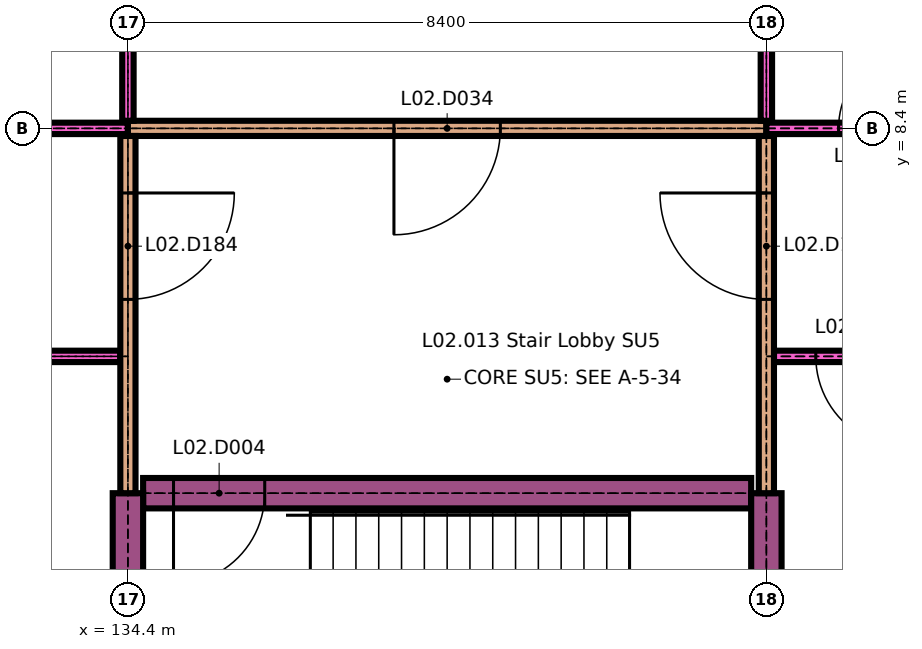
"""IFC4 building model, lengths in metres.
Left out: names, types, materials, properties, quantities, classifications, styles, units other than length and angle.
Written with IfcOpenShell. Run it as: python <this file> out.ifc"""

import sys

from ifc_helpers import new_model, si_unit, direction, frame, frame_2d, origin, place, context, subcontext, project, spatial, rectangle, extrude, element, fill, save


model = new_model("IFC4")
c1 = context("Model", 3, precision=1e-05, world=origin(), true_north=direction((0.0, 1.0)))
c2 = subcontext(c1, "Body", "Model", "MODEL_VIEW")
j1 = project(units=[si_unit("LENGTHUNIT", "METRE"), si_unit("PLANEANGLEUNIT", "RADIAN")], contexts=[c1])
p1 = place(None, origin())
s1 = spatial("IfcSite", under=j1, at=p1, CompositionType="ELEMENT")
p2 = place(p1, origin())
s2 = spatial("IfcBuilding", under=s1, at=p2, CompositionType="ELEMENT")
p3 = place(p2, frame((0.0, 0.0, 8.4)))
s3 = spatial("IfcBuildingStorey", under=s2, at=p3, CompositionType="ELEMENT", Elevation=8.4)
p4 = place(p3, frame((134.6, 3.6, 0.0), z_axis=(0.0, 0.0, 1.0), x_axis=(1.0, 0.0, 0.0)))
e1 = element("IfcWall", 1, at=p4, inside=s3, PredefinedType="SHEAR", context=c2, shape_type="SweptSolid", body=[
    extrude(rectangle(XDim=8.0, YDim=0.4, at=frame_2d((4.0, 0.0))), origin(), (0.0, 0.0, 1.0), 4.2),
])
p5 = place(p4, frame((0.4, 0.0, 0.0)))
e2 = element("IfcOpeningElement", 2, at=p5, cuts=e1, PredefinedType="OPENING", context=c2, shape_type="SweptSolid", body=[
    extrude(rectangle(XDim=1.2, YDim=2.1, at=frame_2d((0.6, 1.05))), frame((0.0, 0.21, 0.0), z_axis=(0.0, -1.0, 0.0), x_axis=(1.0, 0.0, 0.0)), (0.0, 0.0, 1.0), 0.42),
])
p6 = place(p3, frame((109.3, 5.4, 0.0), z_axis=(0.0, 0.0, 1.0), x_axis=(1.0, 0.0, 0.0)))
e3 = element("IfcWall", 3, at=p6, inside=s3, PredefinedType="PARTITIONING", context=c2, shape_type="SweptSolid", body=[
    extrude(rectangle(XDim=25.0, YDim=0.15, at=frame_2d((12.5, 0.0))), origin(), (0.0, 0.0, 1.0), 4.2),
])
p7 = place(p6, frame((1.55, 0.0, 0.0)))
e4 = element("IfcOpeningElement", 4, at=p7, cuts=e3, PredefinedType="OPENING", context=c2, shape_type="SweptSolid", body=[
    extrude(rectangle(XDim=1.8, YDim=2.4, at=frame_2d((0.9, 1.2))), frame((0.0, 0.085, 0.0), z_axis=(0.0, -1.0, 0.0), x_axis=(1.0, 0.0, 0.0)), (0.0, 0.0, 1.0), 0.17),
])
p8 = place(p6, frame((6.5, 0.0, 0.0)))
e5 = element("IfcOpeningElement", 5, at=p8, cuts=e3, PredefinedType="OPENING", context=c2, shape_type="SweptSolid", body=[
    extrude(rectangle(XDim=1.8, YDim=2.4, at=frame_2d((0.9, 1.2))), frame((0.0, 0.085, 0.0), z_axis=(0.0, -1.0, 0.0), x_axis=(1.0, 0.0, 0.0)), (0.0, 0.0, 1.0), 0.17),
])
p9 = place(p6, frame((11.5, 0.0, 0.0)))
e6 = element("IfcOpeningElement", 6, at=p9, cuts=e3, PredefinedType="OPENING", context=c2, shape_type="SweptSolid", body=[
    extrude(rectangle(XDim=1.8, YDim=2.4, at=frame_2d((0.9, 1.2))), frame((0.0, 0.085, 0.0), z_axis=(0.0, -1.0, 0.0), x_axis=(1.0, 0.0, 0.0)), (0.0, 0.0, 1.0), 0.17),
])
p10 = place(p6, frame((16.5, 0.0, 0.0)))
e7 = element("IfcOpeningElement", 7, at=p10, cuts=e3, PredefinedType="OPENING", context=c2, shape_type="SweptSolid", body=[
    extrude(rectangle(XDim=1.8, YDim=2.4, at=frame_2d((0.9, 1.2))), frame((0.0, 0.085, 0.0), z_axis=(0.0, -1.0, 0.0), x_axis=(1.0, 0.0, 0.0)), (0.0, 0.0, 1.0), 0.17),
])
p11 = place(p6, frame((21.55, 0.0, 0.0)))
e8 = element("IfcOpeningElement", 8, at=p11, cuts=e3, PredefinedType="OPENING", context=c2, shape_type="SweptSolid", body=[
    extrude(rectangle(XDim=1.8, YDim=2.4, at=frame_2d((0.9, 1.2))), frame((0.0, 0.085, 0.0), z_axis=(0.0, -1.0, 0.0), x_axis=(1.0, 0.0, 0.0)), (0.0, 0.0, 1.0), 0.17),
])
p12 = place(p3, frame((142.9, 5.4, 0.0), z_axis=(0.0, 0.0, 1.0), x_axis=(1.0, 0.0, 0.0)))
e9 = element("IfcWall", 9, at=p12, inside=s3, PredefinedType="PARTITIONING", context=c2, shape_type="SweptSolid", body=[
    extrude(rectangle(XDim=24.95, YDim=0.15, at=frame_2d((12.475, 0.0))), origin(), (0.0, 0.0, 1.0), 4.2),
])
p13 = place(p12, frame((0.55, 0.0, 0.0)))
e10 = element("IfcOpeningElement", 10, at=p13, cuts=e9, PredefinedType="OPENING", context=c2, shape_type="SweptSolid", body=[
    extrude(rectangle(XDim=1.2, YDim=2.1, at=frame_2d((0.6, 1.05))), frame((0.0, 0.085, 0.0), z_axis=(0.0, -1.0, 0.0), x_axis=(1.0, 0.0, 0.0)), (0.0, 0.0, 1.0), 0.17),
])
p14 = place(p12, frame((7.7, 0.0, 0.0)))
e11 = element("IfcOpeningElement", 11, at=p14, cuts=e9, PredefinedType="OPENING", context=c2, shape_type="SweptSolid", body=[
    extrude(rectangle(XDim=1.2, YDim=2.1, at=frame_2d((0.6, 1.05))), frame((0.0, 0.085, 0.0), z_axis=(0.0, -1.0, 0.0), x_axis=(1.0, 0.0, 0.0)), (0.0, 0.0, 1.0), 0.17),
])
p15 = place(p12, frame((16.1, 0.0, 0.0)))
e12 = element("IfcOpeningElement", 12, at=p15, cuts=e9, PredefinedType="OPENING", context=c2, shape_type="SweptSolid", body=[
    extrude(rectangle(XDim=1.8, YDim=2.4, at=frame_2d((0.9, 1.2))), frame((0.0, 0.085, 0.0), z_axis=(0.0, -1.0, 0.0), x_axis=(1.0, 0.0, 0.0)), (0.0, 0.0, 1.0), 0.17),
])
p16 = place(p12, frame((21.425, 0.0, 0.0)))
e13 = element("IfcOpeningElement", 13, at=p16, cuts=e9, PredefinedType="OPENING", context=c2, shape_type="SweptSolid", body=[
    extrude(rectangle(XDim=1.8, YDim=2.4, at=frame_2d((0.9, 1.2))), frame((0.0, 0.085, 0.0), z_axis=(0.0, -1.0, 0.0), x_axis=(1.0, 0.0, 0.0)), (0.0, 0.0, 1.0), 0.17),
])
p17 = place(p3, frame((126.45, 8.4, 0.0), z_axis=(0.0, 0.0, 1.0), x_axis=(1.0, 0.0, 0.0)))
e14 = element("IfcWall", 14, at=p17, inside=s3, PredefinedType="PARTITIONING", context=c2, shape_type="SweptSolid", body=[
    extrude(rectangle(XDim=7.95, YDim=0.15, at=frame_2d((3.975, 0.0))), origin(), (0.0, 0.0, 1.0), 4.2),
])
p18 = place(p17, frame((0.425, 0.0, 0.0)))
e15 = element("IfcOpeningElement", 15, at=p18, cuts=e14, PredefinedType="OPENING", context=c2, shape_type="SweptSolid", body=[
    extrude(rectangle(XDim=1.1, YDim=2.1, at=frame_2d((0.55, 1.05))), frame((0.0, 0.085, 0.0), z_axis=(0.0, -1.0, 0.0), x_axis=(1.0, 0.0, 0.0)), (0.0, 0.0, 1.0), 0.17),
])
p19 = place(p17, frame((2.9, 0.0, 0.0)))
e16 = element("IfcOpeningElement", 16, at=p19, cuts=e14, PredefinedType="OPENING", context=c2, shape_type="SweptSolid", body=[
    extrude(rectangle(XDim=1.1, YDim=2.1, at=frame_2d((0.55, 1.05))), frame((0.0, 0.085, 0.0), z_axis=(0.0, -1.0, 0.0), x_axis=(1.0, 0.0, 0.0)), (0.0, 0.0, 1.0), 0.17),
])
p20 = place(p3, frame((134.4, 8.4, 0.0), z_axis=(0.0, 0.0, 1.0), x_axis=(1.0, 0.0, 0.0)))
e17 = element("IfcWall", 17, at=p20, inside=s3, PredefinedType="PARTITIONING", context=c2, shape_type="SweptSolid", body=[
    extrude(rectangle(XDim=8.4, YDim=0.2, at=frame_2d((4.2, 0.0))), origin(), (0.0, 0.0, 1.0), 4.2),
])
p21 = place(p20, frame((3.5, 0.0, 0.0)))
e18 = element("IfcOpeningElement", 18, at=p21, cuts=e17, PredefinedType="OPENING", context=c2, shape_type="SweptSolid", body=[
    extrude(rectangle(XDim=1.4, YDim=2.1, at=frame_2d((0.7, 1.05))), frame((0.0, 0.11, 0.0), z_axis=(0.0, -1.0, 0.0), x_axis=(1.0, 0.0, 0.0)), (0.0, 0.0, 1.0), 0.22),
])
p22 = place(p3, frame((142.8, 8.4, 0.0), z_axis=(0.0, 0.0, 1.0), x_axis=(1.0, 0.0, 0.0)))
e19 = element("IfcWall", 19, at=p22, inside=s3, PredefinedType="PARTITIONING", context=c2, shape_type="SweptSolid", body=[
    extrude(rectangle(XDim=3.075, YDim=0.15, at=frame_2d((1.538, 0.0))), origin(), (0.0, 0.0, 1.0), 4.2),
])
p23 = place(p22, frame((0.95, 0.0, 0.0)))
e20 = element("IfcOpeningElement", 20, at=p23, cuts=e19, PredefinedType="OPENING", context=c2, shape_type="SweptSolid", body=[
    extrude(rectangle(XDim=1.1, YDim=2.1, at=frame_2d((0.55, 1.05))), frame((0.0, 0.085, 0.0), z_axis=(0.0, -1.0, 0.0), x_axis=(1.0, 0.0, 0.0)), (0.0, 0.0, 1.0), 0.17),
])
p24 = place(p3, frame((134.4, 0.15, 0.0), z_axis=(0.0, 0.0, 1.0), x_axis=(0.0, 1.0, 0.0)))
e21 = element("IfcWall", 21, at=p24, inside=s3, PredefinedType="SHEAR", context=c2, shape_type="SweptSolid", body=[
    extrude(rectangle(XDim=3.45, YDim=0.4, at=frame_2d((1.725, 0.0))), origin(), (0.0, 0.0, 1.0), 4.2),
])
p25 = place(p3, frame((134.4, 3.6, 0.0), z_axis=(0.0, 0.0, 1.0), x_axis=(0.0, 1.0, 0.0)))
e22 = element("IfcWall", 22, at=p25, inside=s3, PredefinedType="PARTITIONING", context=c2, shape_type="SweptSolid", body=[
    extrude(rectangle(XDim=4.7, YDim=0.2, at=frame_2d((2.35, 0.0))), origin(), (0.0, 0.0, 1.0), 4.2),
])
p26 = place(p25, frame((2.55, 0.0, 0.0)))
e23 = element("IfcOpeningElement", 23, at=p26, cuts=e22, PredefinedType="OPENING", context=c2, shape_type="SweptSolid", body=[
    extrude(rectangle(XDim=1.4, YDim=2.1, at=frame_2d((0.7, 1.05))), frame((0.0, 0.11, 0.0), z_axis=(0.0, -1.0, 0.0), x_axis=(1.0, 0.0, 0.0)), (0.0, 0.0, 1.0), 0.22),
])
p27 = place(p3, frame((134.4, 8.5, 0.0), z_axis=(0.0, 0.0, 1.0), x_axis=(0.0, 1.0, 0.0)))
e24 = element("IfcWall", 24, at=p27, inside=s3, PredefinedType="PARTITIONING", context=c2, shape_type="SweptSolid", body=[
    extrude(rectangle(XDim=5.225, YDim=0.15, at=frame_2d((2.613, 0.0))), origin(), (0.0, 0.0, 1.0), 4.2),
])
p28 = place(p3, frame((142.8, 0.15, 0.0), z_axis=(0.0, 0.0, 1.0), x_axis=(0.0, 1.0, 0.0)))
e25 = element("IfcWall", 25, at=p28, inside=s3, PredefinedType="SHEAR", context=c2, shape_type="SweptSolid", body=[
    extrude(rectangle(XDim=3.45, YDim=0.4, at=frame_2d((1.725, 0.0))), origin(), (0.0, 0.0, 1.0), 4.2),
])
p29 = place(p3, frame((142.8, 3.6, 0.0), z_axis=(0.0, 0.0, 1.0), x_axis=(0.0, 1.0, 0.0)))
e26 = element("IfcWall", 26, at=p29, inside=s3, PredefinedType="PARTITIONING", context=c2, shape_type="SweptSolid", body=[
    extrude(rectangle(XDim=4.7, YDim=0.2, at=frame_2d((2.35, 0.0))), origin(), (0.0, 0.0, 1.0), 4.2),
])
p30 = place(p29, frame((2.55, 0.0, 0.0)))
e27 = element("IfcOpeningElement", 27, at=p30, cuts=e26, PredefinedType="OPENING", context=c2, shape_type="SweptSolid", body=[
    extrude(rectangle(XDim=1.4, YDim=2.1, at=frame_2d((0.7, 1.05))), frame((0.0, 0.11, 0.0), z_axis=(0.0, -1.0, 0.0), x_axis=(1.0, 0.0, 0.0)), (0.0, 0.0, 1.0), 0.22),
])
p31 = place(p3, frame((142.8, 8.5, 0.0), z_axis=(0.0, 0.0, 1.0), x_axis=(0.0, 1.0, 0.0)))
e28 = element("IfcWall", 28, at=p31, inside=s3, PredefinedType="PARTITIONING", context=c2, shape_type="SweptSolid", body=[
    extrude(rectangle(XDim=5.225, YDim=0.15, at=frame_2d((2.613, 0.0))), origin(), (0.0, 0.0, 1.0), 4.2),
])
p32 = place(p5, origin())
e29 = element("IfcDoor", 29, at=p32, inside=s3, OperationType="SINGLE_SWING_LEFT", PredefinedType="DOOR", context=c2, shape_type="SweptSolid", body=[
    extrude(rectangle(XDim=1.2, YDim=2.1, at=frame_2d((0.6, 1.05))), frame((0.0, 0.025, 0.0), z_axis=(0.0, -1.0, 0.0), x_axis=(1.0, 0.0, 0.0)), (0.0, 0.0, 1.0), 0.05),
])
fill(e2, e29)
p33 = place(p13, origin())
e30 = element("IfcDoor", 30, at=p33, inside=s3, OperationType="SINGLE_SWING_RIGHT", PredefinedType="DOOR", context=c2, shape_type="SweptSolid", body=[
    extrude(rectangle(XDim=1.2, YDim=2.1, at=frame_2d((0.6, 1.05))), frame((0.0, 0.05, 0.0), z_axis=(0.0, -1.0, 0.0), x_axis=(1.0, 0.0, 0.0)), (0.0, 0.0, 1.0), 0.1),
])
fill(e10, e30)
p34 = place(p21, origin())
e31 = element("IfcDoor", 31, at=p34, inside=s3, OperationType="SINGLE_SWING_LEFT", PredefinedType="DOOR", context=c2, shape_type="SweptSolid", body=[
    extrude(rectangle(XDim=1.4, YDim=2.1, at=frame_2d((0.7, 1.05))), frame((0.0, 0.025, 0.0), z_axis=(0.0, -1.0, 0.0), x_axis=(1.0, 0.0, 0.0)), (0.0, 0.0, 1.0), 0.05),
])
fill(e18, e31)
p35 = place(p23, origin())
e32 = element("IfcDoor", 32, at=p35, inside=s3, OperationType="SINGLE_SWING_LEFT", PredefinedType="DOOR", context=c2, shape_type="SweptSolid", body=[
    extrude(rectangle(XDim=1.1, YDim=2.1, at=frame_2d((0.55, 1.05))), frame((0.0, 0.025, 0.0), z_axis=(0.0, -1.0, 0.0), x_axis=(1.0, 0.0, 0.0)), (0.0, 0.0, 1.0), 0.05),
])
fill(e20, e32)
p36 = place(p26, origin())
e33 = element("IfcDoor", 33, at=p36, inside=s3, OperationType="SINGLE_SWING_RIGHT", PredefinedType="DOOR", context=c2, shape_type="SweptSolid", body=[
    extrude(rectangle(XDim=1.4, YDim=2.1, at=frame_2d((0.7, 1.05))), frame((0.0, 0.03, 0.0), z_axis=(0.0, -1.0, 0.0), x_axis=(1.0, 0.0, 0.0)), (0.0, 0.0, 1.0), 0.06),
])
fill(e23, e33)
p37 = place(p30, origin())
e34 = element("IfcDoor", 34, at=p37, inside=s3, OperationType="SINGLE_SWING_LEFT", PredefinedType="DOOR", context=c2, shape_type="SweptSolid", body=[
    extrude(rectangle(XDim=1.4, YDim=2.1, at=frame_2d((0.7, 1.05))), frame((0.0, 0.03, 0.0), z_axis=(0.0, -1.0, 0.0), x_axis=(1.0, 0.0, 0.0)), (0.0, 0.0, 1.0), 0.06),
])
fill(e27, e34)
save(model, sys.argv[1])
